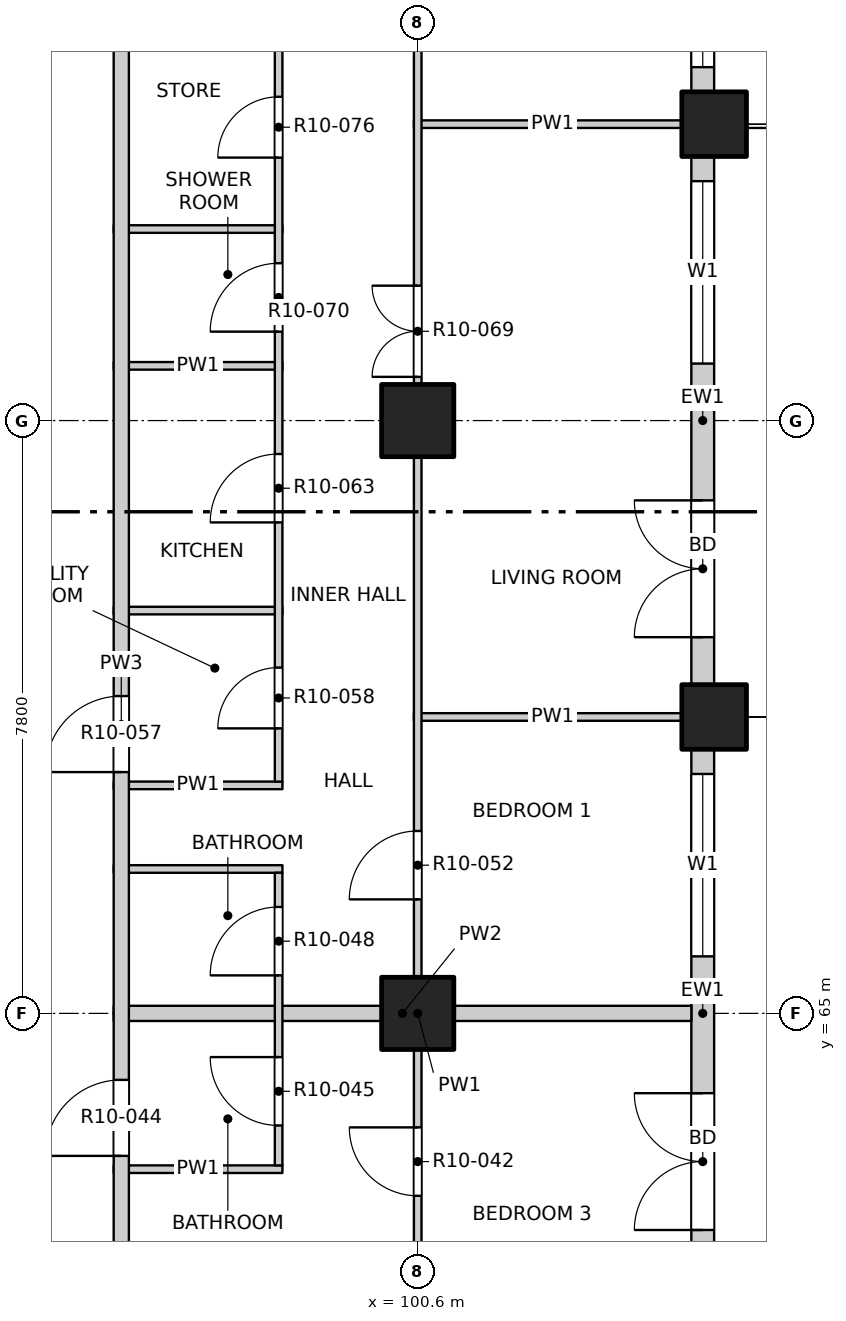
"""IFC4 building model, lengths in metres.
Left out: names, types, materials, properties, quantities, classifications, styles, units other than length and angle.
Written with IfcOpenShell. Run it as: python <this file> out.ifc"""

import sys

from ifc_helpers import new_model, si_unit, direction, frame, frame_2d, origin, origin_2d, place, context, subcontext, project, spatial, rectangle, extrude, element, fill, save


model = new_model("IFC4")
c1 = context("Model", 3, precision=1e-05, world=origin(), true_north=direction((0.0, 1.0)))
c2 = subcontext(c1, "Body", "Model", "MODEL_VIEW")
j1 = project(units=[si_unit("LENGTHUNIT", "METRE"), si_unit("PLANEANGLEUNIT", "RADIAN")], contexts=[c1])
p1 = place(None, origin())
s1 = spatial("IfcSite", under=j1, at=p1, CompositionType="ELEMENT")
p2 = place(p1, origin())
s2 = spatial("IfcBuilding", under=s1, at=p2, CompositionType="ELEMENT")
p3 = place(p2, frame((0.0, 0.0, 127.1)))
s3 = spatial("IfcBuildingStorey", under=s2, at=p3, CompositionType="ELEMENT", Elevation=127.1)
for number, where, z_axis, x_axis in (
    (1, (104.5, 68.9, -0.25), (0.0, 0.0, 1.0), (1.0, 0.0, 0.0)),
    (2, (104.5, 76.7, -0.25), (0.0, 0.0, 1.0), (1.0, 0.0, 0.0)),
):
    element("IfcColumn", number, at=place(p3, frame(where, z_axis=z_axis, x_axis=x_axis)), inside=s3, PredefinedType="COLUMN", context=c2, shape_type="SweptSolid", body=[
        extrude(rectangle(XDim=0.85, YDim=0.85, at=origin_2d()), origin(), (0.0, 0.0, 1.0), 3.4),
    ])
for number, where, z_axis, x_axis in (
    (3, (100.6, 65.0, -0.25), (0.0, 0.0, 1.0), (1.0, 0.0, 0.0)),
    (4, (100.6, 72.8, -0.25), (0.0, 0.0, 1.0), (1.0, 0.0, 0.0)),
):
    element("IfcColumn", number, at=place(p3, frame(where, z_axis=z_axis, x_axis=x_axis)), inside=s3, PredefinedType="COLUMN", context=c2, shape_type="SweptSolid", body=[
        extrude(rectangle(XDim=0.95, YDim=0.95, at=origin_2d()), origin(), (0.0, 0.0, 1.0), 3.4),
    ])
p4 = place(p3, frame((104.35, 61.525, 0.0), z_axis=(0.0, 0.0, 1.0), x_axis=(0.0, 1.0, 0.0)))
e5 = element("IfcWall", 5, at=p4, inside=s3, PredefinedType="SOLIDWALL", context=c2, shape_type="SweptSolid", body=[
    extrude(rectangle(XDim=6.95, YDim=0.3, at=frame_2d((3.475, 0.0))), origin(), (0.0, 0.0, 1.0), 2.7),
])
p5 = place(p4, frame((0.625, 0.0, 0.0)))
e6 = element("IfcOpeningElement", 6, at=p5, cuts=e5, PredefinedType="OPENING", context=c2, shape_type="SweptSolid", body=[
    extrude(rectangle(XDim=1.8, YDim=2.4, at=frame_2d((0.9, 1.2))), frame((0.0, 0.16, 0.0), z_axis=(0.0, -1.0, 0.0), x_axis=(1.0, 0.0, 0.0)), (0.0, 0.0, 1.0), 0.32),
])
p6 = place(p4, frame((4.225, 0.0, 0.9)))
e7 = element("IfcOpeningElement", 7, at=p6, cuts=e5, PredefinedType="OPENING", context=c2, shape_type="SweptSolid", body=[
    extrude(rectangle(XDim=2.4, YDim=1.8, at=frame_2d((1.2, 0.9))), frame((0.0, 0.16, 0.0), z_axis=(0.0, -1.0, 0.0), x_axis=(1.0, 0.0, 0.0)), (0.0, 0.0, 1.0), 0.32),
])
p7 = place(p3, frame((104.35, 69.325, 0.0), z_axis=(0.0, 0.0, 1.0), x_axis=(0.0, 1.0, 0.0)))
e8 = element("IfcWall", 8, at=p7, inside=s3, PredefinedType="SOLIDWALL", context=c2, shape_type="SweptSolid", body=[
    extrude(rectangle(XDim=6.95, YDim=0.3, at=frame_2d((3.475, 0.0))), origin(), (0.0, 0.0, 1.0), 2.7),
])
p8 = place(p7, frame((0.625, 0.0, 0.0)))
e9 = element("IfcOpeningElement", 9, at=p8, cuts=e8, PredefinedType="OPENING", context=c2, shape_type="SweptSolid", body=[
    extrude(rectangle(XDim=1.8, YDim=2.4, at=frame_2d((0.9, 1.2))), frame((0.0, 0.16, 0.0), z_axis=(0.0, -1.0, 0.0), x_axis=(1.0, 0.0, 0.0)), (0.0, 0.0, 1.0), 0.32),
])
p9 = place(p7, frame((4.225, 0.0, 0.9)))
e10 = element("IfcOpeningElement", 10, at=p9, cuts=e8, PredefinedType="OPENING", context=c2, shape_type="SweptSolid", body=[
    extrude(rectangle(XDim=2.4, YDim=1.8, at=frame_2d((1.2, 0.9))), frame((0.0, 0.16, 0.0), z_axis=(0.0, -1.0, 0.0), x_axis=(1.0, 0.0, 0.0)), (0.0, 0.0, 1.0), 0.32),
])
p10 = place(p3, frame((104.35, 77.125, 0.0), z_axis=(0.0, 0.0, 1.0), x_axis=(0.0, 1.0, 0.0)))
e11 = element("IfcWall", 11, at=p10, inside=s3, PredefinedType="SOLIDWALL", context=c2, shape_type="SweptSolid", body=[
    extrude(rectangle(XDim=3.475, YDim=0.3, at=frame_2d((1.738, 0.0))), origin(), (0.0, 0.0, 1.0), 2.7),
])
p11 = place(p10, frame((0.325, 0.0, 0.9)))
e12 = element("IfcOpeningElement", 12, at=p11, cuts=e11, PredefinedType="OPENING", context=c2, shape_type="SweptSolid", body=[
    extrude(rectangle(XDim=2.4, YDim=1.8, at=frame_2d((1.2, 0.9))), frame((0.0, 0.16, 0.0), z_axis=(0.0, -1.0, 0.0), x_axis=(1.0, 0.0, 0.0)), (0.0, 0.0, 1.0), 0.32),
])
p12 = place(p3, frame((96.6, 62.95, 0.0), z_axis=(0.0, 0.0, 1.0), x_axis=(1.0, 0.0, 0.0)))
e13 = element("IfcWall", 13, at=p12, inside=s3, PredefinedType="PARTITIONING", context=c2, shape_type="SweptSolid", body=[
    extrude(rectangle(XDim=2.22, YDim=0.1, at=frame_2d((1.11, 0.0))), origin(), (0.0, 0.0, 1.0), 3.15),
])
p13 = place(p3, frame((96.6, 65.0, 0.0), z_axis=(0.0, 0.0, 1.0), x_axis=(1.0, 0.0, 0.0)))
e14 = element("IfcWall", 14, at=p13, inside=s3, PredefinedType="PARTITIONING", context=c2, shape_type="SweptSolid", body=[
    extrude(rectangle(XDim=7.6, YDim=0.2, at=frame_2d((3.8, 0.0))), origin(), (0.0, 0.0, 1.0), 3.15),
])
for number, where, z_axis, x_axis in (
    (15, (96.6, 66.9, 0.0), (0.0, 0.0, 1.0), (1.0, 0.0, 0.0)),
    (16, (96.6, 68.0, 0.0), (0.0, 0.0, 1.0), (1.0, 0.0, 0.0)),
):
    element("IfcWall", number, at=place(p3, frame(where, z_axis=z_axis, x_axis=x_axis)), inside=s3, PredefinedType="PARTITIONING", context=c2, shape_type="SweptSolid", body=[
        extrude(rectangle(XDim=2.22, YDim=0.1, at=frame_2d((1.11, 0.0))), origin(), (0.0, 0.0, 1.0), 3.15),
    ])
p14 = place(p3, frame((100.55, 68.9, 0.0), z_axis=(0.0, 0.0, 1.0), x_axis=(1.0, 0.0, 0.0)))
e17 = element("IfcWall", 17, at=p14, inside=s3, PredefinedType="PARTITIONING", context=c2, shape_type="SweptSolid", body=[
    extrude(rectangle(XDim=3.65, YDim=0.1, at=frame_2d((1.825, 0.0))), origin(), (0.0, 0.0, 1.0), 2.55),
])
for number, where, z_axis, x_axis in (
    (18, (96.6, 70.3, 0.0), (0.0, 0.0, 1.0), (1.0, 0.0, 0.0)),
    (19, (96.6, 73.52, 0.0), (0.0, 0.0, 1.0), (1.0, 0.0, 0.0)),
    (20, (96.6, 75.32, 0.0), (0.0, 0.0, 1.0), (1.0, 0.0, 0.0)),
):
    element("IfcWall", number, at=place(p3, frame(where, z_axis=z_axis, x_axis=x_axis)), inside=s3, PredefinedType="PARTITIONING", context=c2, shape_type="SweptSolid", body=[
        extrude(rectangle(XDim=2.22, YDim=0.1, at=frame_2d((1.11, 0.0))), origin(), (0.0, 0.0, 1.0), 3.15),
    ])
p15 = place(p3, frame((100.55, 76.7, 0.0), z_axis=(0.0, 0.0, 1.0), x_axis=(1.0, 0.0, 0.0)))
e21 = element("IfcWall", 21, at=p15, inside=s3, PredefinedType="PARTITIONING", context=c2, shape_type="SweptSolid", body=[
    extrude(rectangle(XDim=3.65, YDim=0.1, at=frame_2d((1.825, 0.0))), origin(), (0.0, 0.0, 1.0), 2.55),
])
p16 = place(p3, frame((96.7, 53.4, 0.0), z_axis=(0.0, 0.0, 1.0), x_axis=(0.0, 1.0, 0.0)))
e22 = element("IfcWall", 22, at=p16, inside=s3, PredefinedType="PARTITIONING", context=c2, shape_type="SweptSolid", body=[
    extrude(rectangle(XDim=30.8, YDim=0.2, at=frame_2d((15.4, 0.0))), origin(), (0.0, 0.0, 1.0), 3.15),
])
p17 = place(p16, frame((9.725, 0.0, 0.0)))
e23 = element("IfcOpeningElement", 23, at=p17, cuts=e22, PredefinedType="OPENING", context=c2, shape_type="SweptSolid", body=[
    extrude(rectangle(XDim=1.0, YDim=2.1, at=frame_2d((0.5, 1.05))), frame((0.0, 0.11, 0.0), z_axis=(0.0, -1.0, 0.0), x_axis=(1.0, 0.0, 0.0)), (0.0, 0.0, 1.0), 0.22),
])
p18 = place(p16, frame((14.775, 0.0, 0.0)))
e24 = element("IfcOpeningElement", 24, at=p18, cuts=e22, PredefinedType="OPENING", context=c2, shape_type="SweptSolid", body=[
    extrude(rectangle(XDim=1.0, YDim=2.1, at=frame_2d((0.5, 1.05))), frame((0.0, 0.11, 0.0), z_axis=(0.0, -1.0, 0.0), x_axis=(1.0, 0.0, 0.0)), (0.0, 0.0, 1.0), 0.22),
])
p19 = place(p3, frame((98.77, 63.0, 0.0), z_axis=(0.0, 0.0, 1.0), x_axis=(0.0, 1.0, 0.0)))
e25 = element("IfcWall", 25, at=p19, inside=s3, PredefinedType="PARTITIONING", context=c2, shape_type="SweptSolid", body=[
    extrude(rectangle(XDim=3.85, YDim=0.1, at=frame_2d((1.925, 0.0))), origin(), (0.0, 0.0, 1.0), 3.15),
])
p20 = place(p19, frame((0.525, 0.0, 0.0)))
e26 = element("IfcOpeningElement", 26, at=p20, cuts=e25, PredefinedType="OPENING", context=c2, shape_type="SweptSolid", body=[
    extrude(rectangle(XDim=0.9, YDim=2.1, at=frame_2d((0.45, 1.05))), frame((0.0, 0.06, 0.0), z_axis=(0.0, -1.0, 0.0), x_axis=(1.0, 0.0, 0.0)), (0.0, 0.0, 1.0), 0.12),
])
p21 = place(p19, frame((2.5, 0.0, 0.0)))
e27 = element("IfcOpeningElement", 27, at=p21, cuts=e25, PredefinedType="OPENING", context=c2, shape_type="SweptSolid", body=[
    extrude(rectangle(XDim=0.9, YDim=2.1, at=frame_2d((0.45, 1.05))), frame((0.0, 0.06, 0.0), z_axis=(0.0, -1.0, 0.0), x_axis=(1.0, 0.0, 0.0)), (0.0, 0.0, 1.0), 0.12),
])
p22 = place(p3, frame((98.77, 68.05, 0.0), z_axis=(0.0, 0.0, 1.0), x_axis=(0.0, 1.0, 0.0)))
e28 = element("IfcWall", 28, at=p22, inside=s3, PredefinedType="PARTITIONING", context=c2, shape_type="SweptSolid", body=[
    extrude(rectangle(XDim=12.5, YDim=0.1, at=frame_2d((6.25, 0.0))), origin(), (0.0, 0.0, 1.0), 3.15),
])
p23 = place(p22, frame((0.7, 0.0, 0.0)))
e29 = element("IfcOpeningElement", 29, at=p23, cuts=e28, PredefinedType="OPENING", context=c2, shape_type="SweptSolid", body=[
    extrude(rectangle(XDim=0.8, YDim=2.1, at=frame_2d((0.4, 1.05))), frame((0.0, 0.06, 0.0), z_axis=(0.0, -1.0, 0.0), x_axis=(1.0, 0.0, 0.0)), (0.0, 0.0, 1.0), 0.12),
])
p24 = place(p22, frame((3.41, 0.0, 0.0)))
e30 = element("IfcOpeningElement", 30, at=p24, cuts=e28, PredefinedType="OPENING", context=c2, shape_type="SweptSolid", body=[
    extrude(rectangle(XDim=0.9, YDim=2.1, at=frame_2d((0.45, 1.05))), frame((0.0, 0.06, 0.0), z_axis=(0.0, -1.0, 0.0), x_axis=(1.0, 0.0, 0.0)), (0.0, 0.0, 1.0), 0.12),
])
p25 = place(p22, frame((5.92, 0.0, 0.0)))
e31 = element("IfcOpeningElement", 31, at=p25, cuts=e28, PredefinedType="OPENING", context=c2, shape_type="SweptSolid", body=[
    extrude(rectangle(XDim=0.9, YDim=2.1, at=frame_2d((0.45, 1.05))), frame((0.0, 0.06, 0.0), z_axis=(0.0, -1.0, 0.0), x_axis=(1.0, 0.0, 0.0)), (0.0, 0.0, 1.0), 0.12),
])
p26 = place(p22, frame((8.21, 0.0, 0.0)))
e32 = element("IfcOpeningElement", 32, at=p26, cuts=e28, PredefinedType="OPENING", context=c2, shape_type="SweptSolid", body=[
    extrude(rectangle(XDim=0.8, YDim=2.1, at=frame_2d((0.4, 1.05))), frame((0.0, 0.06, 0.0), z_axis=(0.0, -1.0, 0.0), x_axis=(1.0, 0.0, 0.0)), (0.0, 0.0, 1.0), 0.12),
])
p27 = place(p22, frame((10.85, 0.0, 0.0)))
e33 = element("IfcOpeningElement", 33, at=p27, cuts=e28, PredefinedType="OPENING", context=c2, shape_type="SweptSolid", body=[
    extrude(rectangle(XDim=0.8, YDim=2.1, at=frame_2d((0.4, 1.05))), frame((0.0, 0.06, 0.0), z_axis=(0.0, -1.0, 0.0), x_axis=(1.0, 0.0, 0.0)), (0.0, 0.0, 1.0), 0.12),
])
p28 = place(p3, frame((100.6, 45.8, 0.0), z_axis=(0.0, 0.0, 1.0), x_axis=(0.0, 1.0, 0.0)))
e34 = element("IfcWall", 34, at=p28, inside=s3, PredefinedType="PARTITIONING", context=c2, shape_type="SweptSolid", body=[
    extrude(rectangle(XDim=38.4, YDim=0.1, at=frame_2d((19.2, 0.0))), origin(), (0.0, 0.0, 1.0), 3.15),
])
p29 = place(p28, frame((1.05, 0.0, 0.0)))
e35 = element("IfcOpeningElement", 35, at=p29, cuts=e34, PredefinedType="OPENING", context=c2, shape_type="SweptSolid", body=[
    extrude(rectangle(XDim=1.2, YDim=2.1, at=frame_2d((0.6, 1.05))), frame((0.0, 0.06, 0.0), z_axis=(0.0, -1.0, 0.0), x_axis=(1.0, 0.0, 0.0)), (0.0, 0.0, 1.0), 0.12),
])
p30 = place(p28, frame((6.9, 0.0, 0.0)))
e36 = element("IfcOpeningElement", 36, at=p30, cuts=e34, PredefinedType="OPENING", context=c2, shape_type="SweptSolid", body=[
    extrude(rectangle(XDim=1.2, YDim=2.1, at=frame_2d((0.6, 1.05))), frame((0.0, 0.06, 0.0), z_axis=(0.0, -1.0, 0.0), x_axis=(1.0, 0.0, 0.0)), (0.0, 0.0, 1.0), 0.12),
])
p31 = place(p28, frame((12.9, 0.0, 0.0)))
e37 = element("IfcOpeningElement", 37, at=p31, cuts=e34, PredefinedType="OPENING", context=c2, shape_type="SweptSolid", body=[
    extrude(rectangle(XDim=0.9, YDim=2.1, at=frame_2d((0.45, 1.05))), frame((0.0, 0.06, 0.0), z_axis=(0.0, -1.0, 0.0), x_axis=(1.0, 0.0, 0.0)), (0.0, 0.0, 1.0), 0.12),
])
p32 = place(p28, frame((16.8, 0.0, 0.0)))
e38 = element("IfcOpeningElement", 38, at=p32, cuts=e34, PredefinedType="OPENING", context=c2, shape_type="SweptSolid", body=[
    extrude(rectangle(XDim=0.9, YDim=2.1, at=frame_2d((0.45, 1.05))), frame((0.0, 0.06, 0.0), z_axis=(0.0, -1.0, 0.0), x_axis=(1.0, 0.0, 0.0)), (0.0, 0.0, 1.0), 0.12),
])
p33 = place(p28, frame((20.7, 0.0, 0.0)))
e39 = element("IfcOpeningElement", 39, at=p33, cuts=e34, PredefinedType="OPENING", context=c2, shape_type="SweptSolid", body=[
    extrude(rectangle(XDim=0.9, YDim=2.1, at=frame_2d((0.45, 1.05))), frame((0.0, 0.06, 0.0), z_axis=(0.0, -1.0, 0.0), x_axis=(1.0, 0.0, 0.0)), (0.0, 0.0, 1.0), 0.12),
])
p34 = place(p28, frame((27.575, 0.0, 0.0)))
e40 = element("IfcOpeningElement", 40, at=p34, cuts=e34, PredefinedType="OPENING", context=c2, shape_type="SweptSolid", body=[
    extrude(rectangle(XDim=1.2, YDim=2.1, at=frame_2d((0.6, 1.05))), frame((0.0, 0.06, 0.0), z_axis=(0.0, -1.0, 0.0), x_axis=(1.0, 0.0, 0.0)), (0.0, 0.0, 1.0), 0.12),
])
p35 = place(p28, frame((32.4, 0.0, 0.0)))
e41 = element("IfcOpeningElement", 41, at=p35, cuts=e34, PredefinedType="OPENING", context=c2, shape_type="SweptSolid", body=[
    extrude(rectangle(XDim=0.9, YDim=2.1, at=frame_2d((0.45, 1.05))), frame((0.0, 0.06, 0.0), z_axis=(0.0, -1.0, 0.0), x_axis=(1.0, 0.0, 0.0)), (0.0, 0.0, 1.0), 0.12),
])
p36 = place(p28, frame((36.15, 0.0, 0.0)))
e42 = element("IfcOpeningElement", 42, at=p36, cuts=e34, PredefinedType="OPENING", context=c2, shape_type="SweptSolid", body=[
    extrude(rectangle(XDim=1.2, YDim=2.1, at=frame_2d((0.6, 1.05))), frame((0.0, 0.06, 0.0), z_axis=(0.0, -1.0, 0.0), x_axis=(1.0, 0.0, 0.0)), (0.0, 0.0, 1.0), 0.12),
])
p37 = place(p5, origin())
e43 = element("IfcDoor", 43, at=p37, inside=s3, OperationType="DOUBLE_DOOR_SINGLE_SWING", PredefinedType="DOOR", context=c2, shape_type="SweptSolid", body=[
    extrude(rectangle(XDim=1.8, YDim=2.4, at=frame_2d((0.9, 1.2))), frame((0.0, 0.025, 0.0), z_axis=(0.0, -1.0, 0.0), x_axis=(1.0, 0.0, 0.0)), (0.0, 0.0, 1.0), 0.05),
])
fill(e6, e43)
p38 = place(p6, origin())
e44 = element("IfcWindow", 44, at=p38, inside=s3, PartitioningType="DOUBLE_PANEL_VERTICAL", PredefinedType="WINDOW", context=c2, shape_type="SweptSolid", body=[
    extrude(rectangle(XDim=2.4, YDim=1.8, at=frame_2d((1.2, 0.9))), frame((0.0, 0.03, 0.0), z_axis=(0.0, -1.0, 0.0), x_axis=(1.0, 0.0, 0.0)), (0.0, 0.0, 1.0), 0.06),
])
fill(e7, e44)
p39 = place(p8, origin())
e45 = element("IfcDoor", 45, at=p39, inside=s3, OperationType="DOUBLE_DOOR_SINGLE_SWING", PredefinedType="DOOR", context=c2, shape_type="SweptSolid", body=[
    extrude(rectangle(XDim=1.8, YDim=2.4, at=frame_2d((0.9, 1.2))), frame((0.0, 0.025, 0.0), z_axis=(0.0, -1.0, 0.0), x_axis=(1.0, 0.0, 0.0)), (0.0, 0.0, 1.0), 0.05),
])
fill(e9, e45)
p40 = place(p9, origin())
e46 = element("IfcWindow", 46, at=p40, inside=s3, PartitioningType="DOUBLE_PANEL_VERTICAL", PredefinedType="WINDOW", context=c2, shape_type="SweptSolid", body=[
    extrude(rectangle(XDim=2.4, YDim=1.8, at=frame_2d((1.2, 0.9))), frame((0.0, 0.03, 0.0), z_axis=(0.0, -1.0, 0.0), x_axis=(1.0, 0.0, 0.0)), (0.0, 0.0, 1.0), 0.06),
])
fill(e10, e46)
p41 = place(p11, origin())
e47 = element("IfcWindow", 47, at=p41, inside=s3, PartitioningType="DOUBLE_PANEL_VERTICAL", PredefinedType="WINDOW", context=c2, shape_type="SweptSolid", body=[
    extrude(rectangle(XDim=2.4, YDim=1.8, at=frame_2d((1.2, 0.9))), frame((0.0, 0.03, 0.0), z_axis=(0.0, -1.0, 0.0), x_axis=(1.0, 0.0, 0.0)), (0.0, 0.0, 1.0), 0.06),
])
fill(e12, e47)
p42 = place(p32, origin())
e48 = element("IfcDoor", 48, at=p42, inside=s3, OperationType="SINGLE_SWING_RIGHT", PredefinedType="DOOR", context=c2, shape_type="SweptSolid", body=[
    extrude(rectangle(XDim=0.9, YDim=2.1, at=frame_2d((0.45, 1.05))), frame((0.0, 0.025, 0.0), z_axis=(0.0, -1.0, 0.0), x_axis=(1.0, 0.0, 0.0)), (0.0, 0.0, 1.0), 0.05),
])
fill(e38, e48)
p43 = place(p17, origin())
e49 = element("IfcDoor", 49, at=p43, inside=s3, OperationType="SINGLE_SWING_LEFT", PredefinedType="DOOR", context=c2, shape_type="SweptSolid", body=[
    extrude(rectangle(XDim=1.0, YDim=2.1, at=frame_2d((0.5, 1.05))), frame((0.0, 0.025, 0.0), z_axis=(0.0, -1.0, 0.0), x_axis=(1.0, 0.0, 0.0)), (0.0, 0.0, 1.0), 0.05),
])
fill(e23, e49)
p44 = place(p20, origin())
e50 = element("IfcDoor", 50, at=p44, inside=s3, OperationType="SINGLE_SWING_RIGHT", PredefinedType="DOOR", context=c2, shape_type="SweptSolid", body=[
    extrude(rectangle(XDim=0.9, YDim=2.1, at=frame_2d((0.45, 1.05))), frame((0.0, 0.025, 0.0), z_axis=(0.0, -1.0, 0.0), x_axis=(1.0, 0.0, 0.0)), (0.0, 0.0, 1.0), 0.05),
])
fill(e26, e50)
p45 = place(p21, origin())
e51 = element("IfcDoor", 51, at=p45, inside=s3, OperationType="SINGLE_SWING_LEFT", PredefinedType="DOOR", context=c2, shape_type="SweptSolid", body=[
    extrude(rectangle(XDim=0.9, YDim=2.1, at=frame_2d((0.45, 1.05))), frame((0.0, 0.025, 0.0), z_axis=(0.0, -1.0, 0.0), x_axis=(1.0, 0.0, 0.0)), (0.0, 0.0, 1.0), 0.05),
])
fill(e27, e51)
p46 = place(p33, origin())
e52 = element("IfcDoor", 52, at=p46, inside=s3, OperationType="SINGLE_SWING_LEFT", PredefinedType="DOOR", context=c2, shape_type="SweptSolid", body=[
    extrude(rectangle(XDim=0.9, YDim=2.1, at=frame_2d((0.45, 1.05))), frame((0.0, 0.025, 0.0), z_axis=(0.0, -1.0, 0.0), x_axis=(1.0, 0.0, 0.0)), (0.0, 0.0, 1.0), 0.05),
])
fill(e39, e52)
p47 = place(p18, origin())
e53 = element("IfcDoor", 53, at=p47, inside=s3, OperationType="SINGLE_SWING_LEFT", PredefinedType="DOOR", context=c2, shape_type="SweptSolid", body=[
    extrude(rectangle(XDim=1.0, YDim=2.1, at=frame_2d((0.5, 1.05))), frame((0.0, 0.025, 0.0), z_axis=(0.0, -1.0, 0.0), x_axis=(1.0, 0.0, 0.0)), (0.0, 0.0, 1.0), 0.05),
])
fill(e24, e53)
p48 = place(p23, origin())
e54 = element("IfcDoor", 54, at=p48, inside=s3, OperationType="SINGLE_SWING_LEFT", PredefinedType="DOOR", context=c2, shape_type="SweptSolid", body=[
    extrude(rectangle(XDim=0.8, YDim=2.1, at=frame_2d((0.4, 1.05))), frame((0.0, 0.025, 0.0), z_axis=(0.0, -1.0, 0.0), x_axis=(1.0, 0.0, 0.0)), (0.0, 0.0, 1.0), 0.05),
])
fill(e29, e54)
p49 = place(p24, origin())
e55 = element("IfcDoor", 55, at=p49, inside=s3, OperationType="SINGLE_SWING_LEFT", PredefinedType="DOOR", context=c2, shape_type="SweptSolid", body=[
    extrude(rectangle(XDim=0.9, YDim=2.1, at=frame_2d((0.45, 1.05))), frame((0.0, 0.025, 0.0), z_axis=(0.0, -1.0, 0.0), x_axis=(1.0, 0.0, 0.0)), (0.0, 0.0, 1.0), 0.05),
])
fill(e30, e55)
p50 = place(p34, origin())
e56 = element("IfcDoor", 56, at=p50, inside=s3, OperationType="DOUBLE_DOOR_SINGLE_SWING", PredefinedType="DOOR", context=c2, shape_type="SweptSolid", body=[
    extrude(rectangle(XDim=1.2, YDim=2.1, at=frame_2d((0.6, 1.05))), frame((0.0, 0.025, 0.0), z_axis=(0.0, -1.0, 0.0), x_axis=(1.0, 0.0, 0.0)), (0.0, 0.0, 1.0), 0.05),
])
fill(e40, e56)
p51 = place(p25, origin())
e57 = element("IfcDoor", 57, at=p51, inside=s3, OperationType="SINGLE_SWING_LEFT", PredefinedType="DOOR", context=c2, shape_type="SweptSolid", body=[
    extrude(rectangle(XDim=0.9, YDim=2.1, at=frame_2d((0.45, 1.05))), frame((0.0, 0.025, 0.0), z_axis=(0.0, -1.0, 0.0), x_axis=(1.0, 0.0, 0.0)), (0.0, 0.0, 1.0), 0.05),
])
fill(e31, e57)
p52 = place(p26, origin())
e58 = element("IfcDoor", 58, at=p52, inside=s3, OperationType="SINGLE_SWING_LEFT", PredefinedType="DOOR", context=c2, shape_type="SweptSolid", body=[
    extrude(rectangle(XDim=0.8, YDim=2.1, at=frame_2d((0.4, 1.05))), frame((0.0, 0.025, 0.0), z_axis=(0.0, -1.0, 0.0), x_axis=(1.0, 0.0, 0.0)), (0.0, 0.0, 1.0), 0.05),
])
fill(e32, e58)
save(model, sys.argv[1])
